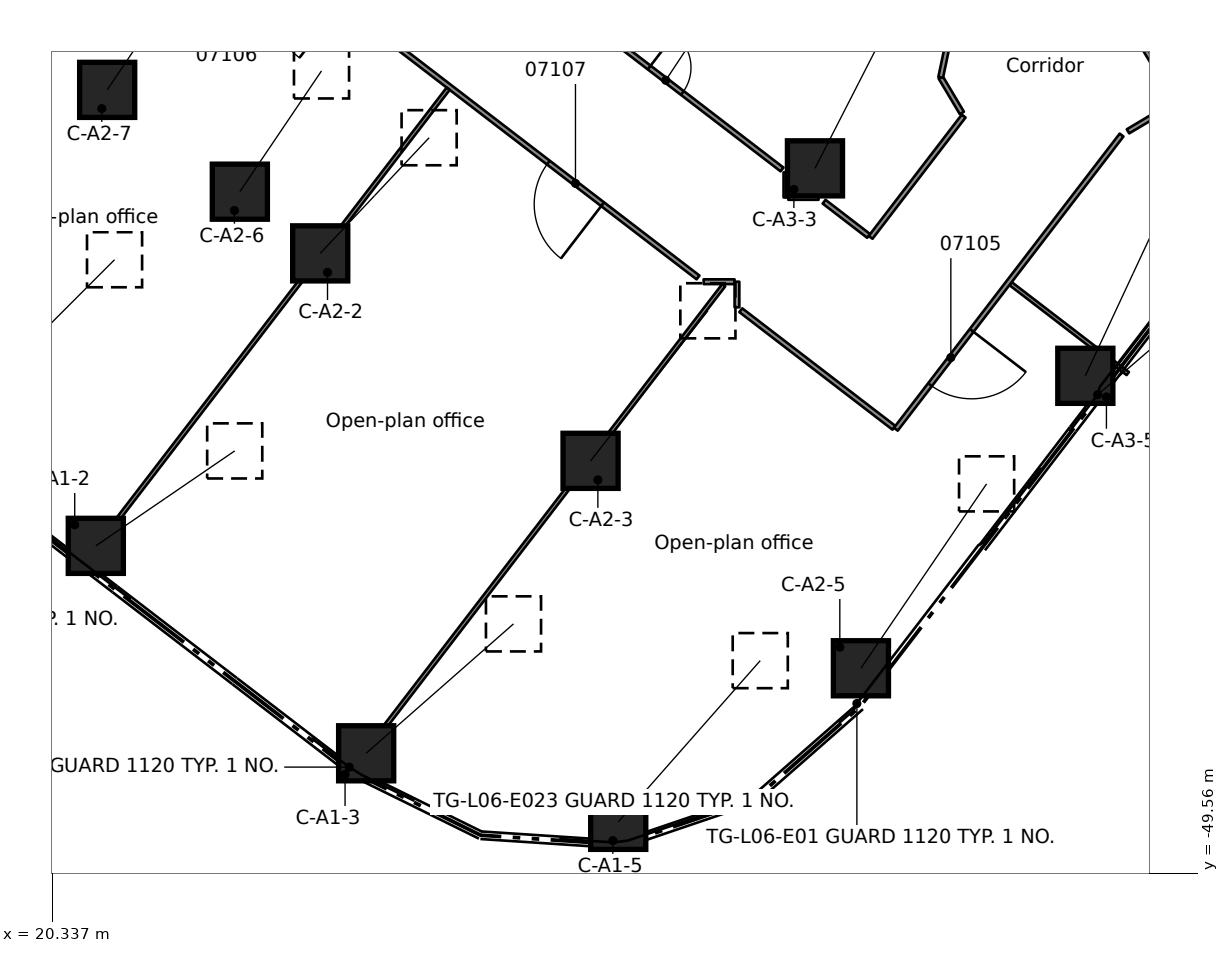
"""IFC4 building model, lengths in metres.
Left out: names, types, materials, properties, quantities, classifications, styles, units other than length and angle.
Written with IfcOpenShell. Run it as: python <this file> out.ifc"""

import sys

from ifc_helpers import new_model, si_unit, direction, frame, frame_2d, origin, origin_2d, place, context, subcontext, project, spatial, rectangle, extrude, element, fill, save


model = new_model("IFC4")
c1 = context("Model", 3, precision=1e-05, world=origin(), true_north=direction((0.0, 1.0)))
c2 = subcontext(c1, "Body", "Model", "MODEL_VIEW")
j1 = project(units=[si_unit("LENGTHUNIT", "METRE"), si_unit("PLANEANGLEUNIT", "RADIAN")], contexts=[c1])
p1 = place(None, origin())
s1 = spatial("IfcSite", under=j1, at=p1, CompositionType="ELEMENT")
p2 = place(p1, origin())
s2 = spatial("IfcBuilding", under=s1, at=p2, CompositionType="ELEMENT")
p3 = place(p2, frame((0.0, 0.0, 33.3)))
s3 = spatial("IfcBuildingStorey", under=s2, at=p3, CompositionType="ELEMENT", Elevation=33.3)
p4 = place(p3, frame((21.484, -40.939, 0.615), z_axis=(0.699835860941, 0.478306093724, 0.530521487263), x_axis=(-0.564258796598, 0.82559797145, 0.0)))
e1 = element("IfcColumn", 1, at=p4, inside=s3, PredefinedType="COLUMN", context=c2, shape_type="SweptSolid", body=[
    extrude(rectangle(XDim=1.45, YDim=1.45, at=origin_2d()), origin(), (0.0, 0.0, 1.0), 5.223),
])
p5 = place(p3, frame((28.598, -46.397, 0.641), z_axis=(0.66484395057, 0.583878759436, 0.465905693967), x_axis=(-0.659873498397, 0.751376713848, 0.0)))
e2 = element("IfcColumn", 2, at=p5, inside=s3, PredefinedType="COLUMN", context=c2, shape_type="SweptSolid", body=[
    extrude(rectangle(XDim=1.45, YDim=1.45, at=origin_2d()), origin(), (0.0, 0.0, 1.0), 5.832),
])
p6 = place(p3, frame((35.231, -48.201, 0.655), z_axis=(0.596874433276, 0.677513116755, 0.429787025777), x_axis=(-0.750349304535, 0.661041542706, 0.0)))
e3 = element("IfcColumn", 3, at=p6, inside=s3, PredefinedType="COLUMN", context=c2, shape_type="SweptSolid", body=[
    extrude(rectangle(XDim=1.45, YDim=1.45, at=origin_2d()), origin(), (0.0, 0.0, 1.0), 6.261),
])
p7 = place(p3, frame((19.364, -36.026, 0.574), z_axis=(0.559599128352, 0.560226540249, 0.610733198008), x_axis=(-0.707502845384, 0.706710495021, 0.0)))
e4 = element("IfcColumn", 4, at=p7, inside=s3, PredefinedType="COLUMN", context=c2, shape_type="SweptSolid", body=[
    extrude(rectangle(XDim=1.45, YDim=1.45, at=origin_2d()), origin(), (0.0, 0.0, 1.0), 4.669),
])
p8 = place(p3, frame((27.389, -33.243, 0.603), z_axis=(0.569969065996, 0.605170324437, 0.555791455699), x_axis=(-0.727961612842, 0.685617889373, 0.0)))
e5 = element("IfcColumn", 5, at=p8, inside=s3, PredefinedType="COLUMN", context=c2, shape_type="SweptSolid", body=[
    extrude(rectangle(XDim=1.45, YDim=1.45, at=origin_2d()), origin(), (0.0, 0.0, 1.0), 5.028),
])
p9 = place(p3, frame((34.503, -38.702, 0.637), z_axis=(0.541117976568, 0.69200623164, 0.477827072073), x_axis=(-0.78775473141, 0.615989028426, 0.0)))
e6 = element("IfcColumn", 6, at=p9, inside=s3, PredefinedType="COLUMN", context=c2, shape_type="SweptSolid", body=[
    extrude(rectangle(XDim=1.45, YDim=1.45, at=origin_2d()), origin(), (0.0, 0.0, 1.0), 5.705),
])
p10 = place(p3, frame((41.617, -44.16, 0.659), z_axis=(0.512352155116, 0.751659115504, 0.415335819823), x_axis=(-0.826300348435, 0.563229734811, 0.0)))
e7 = element("IfcColumn", 7, at=p10, inside=s3, PredefinedType="COLUMN", context=c2, shape_type="SweptSolid", body=[
    extrude(rectangle(XDim=1.45, YDim=1.45, at=origin_2d()), origin(), (0.0, 0.0, 1.0), 6.455),
])
p11 = place(p3, frame((25.274, -31.62, 0.583), z_axis=(0.450601018397, 0.666355112745, 0.594078770819), x_axis=(-0.828380682455, 0.560165551364, 0.0)))
e8 = element("IfcColumn", 8, at=p11, inside=s3, PredefinedType="COLUMN", context=c2, shape_type="SweptSolid", body=[
    extrude(rectangle(XDim=1.45, YDim=1.45, at=origin_2d()), origin(), (0.0, 0.0, 1.0), 4.77),
])
p12 = place(p3, frame((21.783, -28.941, 0.552), z_axis=(0.425847814082, 0.631092139827, 0.648364365376), x_axis=(-0.828933559632, 0.559347078044, 0.0)))
e9 = element("IfcColumn", 9, at=p12, inside=s3, PredefinedType="COLUMN", context=c2, shape_type="SweptSolid", body=[
    extrude(rectangle(XDim=1.45, YDim=1.45, at=origin_2d()), origin(), (0.0, 0.0, 1.0), 4.467),
])
p13 = place(p3, frame((40.408, -31.006, 0.638), z_axis=(0.400711857271, 0.78345915449, 0.474996590187), x_axis=(-0.890307002668, 0.455360781141, 0.0)))
e10 = element("IfcColumn", 10, at=p13, inside=s3, PredefinedType="COLUMN", context=c2, shape_type="SweptSolid", body=[
    extrude(rectangle(XDim=1.45, YDim=1.45, at=origin_2d()), origin(), (0.0, 0.0, 1.0), 5.735),
])
p14 = place(p3, frame((47.522, -36.465, 0.661), z_axis=(0.385700751852, 0.82653899246, 0.409961246905), x_axis=(-0.90619046906, 0.422869759837, 0.0)))
e11 = element("IfcColumn", 11, at=p14, inside=s3, PredefinedType="COLUMN", context=c2, shape_type="SweptSolid", body=[
    extrude(rectangle(XDim=1.45, YDim=1.45, at=origin_2d()), origin(), (0.0, 0.0, 1.0), 6.531),
])
p15 = place(p3, frame((48.015, -26.056, 0.0), z_axis=(0.0, 0.0, 1.0), x_axis=(0.511219942642, -0.859449923059, 0.0)))
e12 = element("IfcWall", 12, at=p15, inside=s3, PredefinedType="PARTITIONING", context=c2, shape_type="SweptSolid", body=[
    extrude(rectangle(XDim=3.676, YDim=0.125, at=frame_2d((1.838, 0.0))), origin(), (0.0, 0.0, 1.0), 3.56),
])
p16 = place(p15, frame((1.088, 0.0, 0.0)))
e13 = element("IfcOpeningElement", 13, at=p16, cuts=e12, PredefinedType="OPENING", context=c2, shape_type="SweptSolid", body=[
    extrude(rectangle(XDim=0.9, YDim=2.1, at=frame_2d((0.45, 1.05))), frame((0.0, 0.073, 0.0), z_axis=(0.0, -1.0, 0.0), x_axis=(1.0, 0.0, 0.0)), (0.0, 0.0, 1.0), 0.145),
])
p17 = place(p3, frame((43.716, -28.613, 0.0), z_axis=(0.0, 0.0, 1.0), x_axis=(0.511956455833, -0.859011401165, 0.0)))
e14 = element("IfcWall", 14, at=p17, inside=s3, PredefinedType="PARTITIONING", context=c2, shape_type="SweptSolid", body=[
    extrude(rectangle(XDim=1.09, YDim=0.125, at=frame_2d((0.545, 0.0))), origin(), (0.0, 0.0, 1.0), 3.56),
])
p18 = place(p3, frame((37.331, -33.877, 0.0), z_axis=(0.0, 0.0, 1.0), x_axis=(-0.793351723993, 0.608763535404, 0.0)))
e15 = element("IfcWall", 15, at=p18, inside=s3, PredefinedType="PARTITIONING", context=c2, shape_type="SweptSolid", body=[
    extrude(rectangle(XDim=16.686, YDim=0.125, at=frame_2d((8.343, 0.0))), origin(), (0.0, 0.0, 1.0), 3.56),
])
p19 = place(p18, frame((11.84, 0.0, 0.0)))
e16 = element("IfcOpeningElement", 16, at=p19, cuts=e15, PredefinedType="OPENING", context=c2, shape_type="SweptSolid", body=[
    extrude(rectangle(XDim=1.8, YDim=2.1, at=frame_2d((0.9, 1.05))), frame((0.0, 0.073, 0.0), z_axis=(0.0, -1.0, 0.0), x_axis=(1.0, 0.0, 0.0)), (0.0, 0.0, 1.0), 0.145),
])
p20 = place(p18, frame((3.166, 0.0, 0.0)))
e17 = element("IfcOpeningElement", 17, at=p20, cuts=e15, PredefinedType="OPENING", context=c2, shape_type="SweptSolid", body=[
    extrude(rectangle(XDim=1.8, YDim=2.1, at=frame_2d((0.9, 1.05))), frame((0.0, 0.073, 0.0), z_axis=(0.0, -1.0, 0.0), x_axis=(1.0, 0.0, 0.0)), (0.0, 0.0, 1.0), 0.145),
])
p21 = place(p3, frame((38.456, -34.739, 0.0), z_axis=(0.0, 0.0, 1.0), x_axis=(0.79321861851, -0.608936961638, 0.0)))
e18 = element("IfcWall", 18, at=p21, inside=s3, PredefinedType="PARTITIONING", context=c2, shape_type="SweptSolid", body=[
    extrude(rectangle(XDim=5.079, YDim=0.125, at=frame_2d((2.54, 0.0))), origin(), (0.0, 0.0, 1.0), 3.56),
])
p22 = place(p3, frame((33.534, -26.426, 0.0), z_axis=(0.0, 0.0, 1.0), x_axis=(0.793385739593, -0.60871920309, 0.0)))
e19 = element("IfcWall", 19, at=p22, inside=s3, PredefinedType="PARTITIONING", context=c2, shape_type="SweptSolid", body=[
    extrude(rectangle(XDim=7.572, YDim=0.125, at=frame_2d((3.786, 0.0))), origin(), (0.0, 0.0, 1.0), 3.56),
])
p23 = place(p22, frame((3.166, 0.0, 0.0)))
e20 = element("IfcOpeningElement", 20, at=p23, cuts=e19, PredefinedType="OPENING", context=c2, shape_type="SweptSolid", body=[
    extrude(rectangle(XDim=1.1, YDim=2.1, at=frame_2d((0.55, 1.05))), frame((0.0, 0.073, 0.0), z_axis=(0.0, -1.0, 0.0), x_axis=(1.0, 0.0, 0.0)), (0.0, 0.0, 1.0), 0.145),
])
p24 = place(p3, frame((40.648, -31.883, 0.0), z_axis=(0.0, 0.0, 1.0), x_axis=(0.792869496174, -0.609391468628, 0.0)))
e21 = element("IfcWall", 21, at=p24, inside=s3, PredefinedType="PARTITIONING", context=c2, shape_type="SweptSolid", body=[
    extrude(rectangle(XDim=1.478, YDim=0.125, at=frame_2d((0.739, 0.0))), origin(), (0.0, 0.0, 1.0), 3.56),
])
p25 = place(p3, frame((45.555, -34.039, 0.0), z_axis=(0.0, 0.0, 1.0), x_axis=(0.793288869705, -0.608845439502, 0.0)))
e22 = element("IfcWall", 22, at=p25, inside=s3, PredefinedType="PARTITIONING", context=c2, shape_type="SweptSolid", body=[
    extrude(rectangle(XDim=3.888, YDim=0.1, at=frame_2d((1.944, 0.0))), origin(), (0.0, 0.0, 1.0), 3.56),
])
p26 = place(p3, frame((37.478, -33.989, 0.0), z_axis=(0.0, 0.0, 1.0), x_axis=(1.0, 0.0, 0.0)))
e23 = element("IfcWall", 23, at=p26, inside=s3, PredefinedType="PARTITIONING", context=c2, shape_type="SweptSolid", body=[
    extrude(rectangle(XDim=0.814, YDim=0.125, at=frame_2d((0.407, 0.0))), origin(), (0.0, 0.0, 1.0), 3.56),
])
p27 = place(p3, frame((39.706, -31.771, 0.0), z_axis=(0.0, 0.0, 1.0), x_axis=(1.0, 0.0, 0.0)))
e24 = element("IfcWall", 24, at=p27, inside=s3, PredefinedType="PARTITIONING", context=c2, shape_type="SweptSolid", body=[
    extrude(rectangle(XDim=0.796, YDim=0.125, at=frame_2d((0.398, 0.0))), origin(), (0.0, 0.0, 1.0), 3.56),
])
p28 = place(p3, frame((48.645, -30.032, 0.0), z_axis=(0.0, 0.0, 1.0), x_axis=(0.859452253387, 0.511216024933, 0.0)))
e25 = element("IfcWall", 25, at=p28, inside=s3, PredefinedType="PARTITIONING", context=c2, shape_type="SweptSolid", body=[
    extrude(rectangle(XDim=1.49, YDim=0.125, at=frame_2d((0.745, 0.0))), origin(), (0.0, 0.0, 1.0), 3.56),
])
p29 = place(p3, frame((43.716, -28.613, 0.0), z_axis=(0.0, 0.0, 1.0), x_axis=(0.205677625046, 0.978619800819, 0.0)))
e26 = element("IfcWall", 26, at=p29, inside=s3, PredefinedType="PARTITIONING", context=c2, shape_type="SweptSolid", body=[
    extrude(rectangle(XDim=1.035, YDim=0.125, at=frame_2d((0.518, 0.0))), origin(), (0.0, 0.0, 1.0), 3.56),
])
p30 = place(p3, frame((48.476, -30.13, 0.0), z_axis=(0.0, 0.0, 1.0), x_axis=(-0.608819151361, -0.793309045036, 0.0)))
e27 = element("IfcWall", 27, at=p30, inside=s3, PredefinedType="PARTITIONING", context=c2, shape_type="SweptSolid", body=[
    extrude(rectangle(XDim=9.757, YDim=0.125, at=frame_2d((4.878, 0.0))), origin(), (0.0, 0.0, 1.0), 3.56),
])
p31 = place(p30, frame((6.479, 0.0, 0.0)))
e28 = element("IfcOpeningElement", 28, at=p31, cuts=e27, PredefinedType="OPENING", context=c2, shape_type="SweptSolid", body=[
    extrude(rectangle(XDim=1.8, YDim=2.1, at=frame_2d((0.9, 1.05))), frame((0.0, 0.073, 0.0), z_axis=(0.0, -1.0, 0.0), x_axis=(1.0, 0.0, 0.0)), (0.0, 0.0, 1.0), 0.145),
])
p32 = place(p3, frame((41.872, -32.822, 0.0), z_axis=(0.0, 0.0, 1.0), x_axis=(0.60869266474, 0.793406100236, 0.0)))
e29 = element("IfcWall", 29, at=p32, inside=s3, PredefinedType="PARTITIONING", context=c2, shape_type="SweptSolid", body=[
    extrude(rectangle(XDim=4.023, YDim=0.125, at=frame_2d((2.012, 0.0))), origin(), (0.0, 0.0, 1.0), 3.56),
])
p33 = place(p3, frame((28.054, -47.051, 0.0), z_axis=(0.0, 0.0, 1.0), x_axis=(0.608787965218, 0.793332977636, 0.0)))
e30 = element("IfcWall", 30, at=p33, inside=s3, PredefinedType="PARTITIONING", context=c2, shape_type="SweptSolid", body=[
    extrude(rectangle(XDim=16.347, YDim=0.1, at=frame_2d((8.174, 0.0))), origin(), (0.0, 0.0, 1.0), 3.56),
])
p34 = place(p3, frame((20.993, -41.633, 0.0), z_axis=(0.0, 0.0, 1.0), x_axis=(0.608805416173, 0.793319585816, 0.0)))
e31 = element("IfcWall", 31, at=p34, inside=s3, PredefinedType="PARTITIONING", context=c2, shape_type="SweptSolid", body=[
    extrude(rectangle(XDim=16.037, YDim=0.1, at=frame_2d((8.018, 0.0))), origin(), (0.0, 0.0, 1.0), 3.56),
])
p35 = place(p3, frame((39.644, -31.771, 0.0), z_axis=(0.0, 0.0, 1.0), x_axis=(0.0, 1.0, 0.0)))
e32 = element("IfcWall", 32, at=p35, inside=s3, PredefinedType="PARTITIONING", context=c2, shape_type="SweptSolid", body=[
    extrude(rectangle(XDim=0.659, YDim=0.125, at=frame_2d((0.33, 0.0))), origin(), (0.0, 0.0, 1.0), 3.56),
])
p36 = place(p3, frame((38.355, -34.662, 0.0), z_axis=(0.0, 0.0, 1.0), x_axis=(0.0, 1.0, 0.0)))
e33 = element("IfcWall", 33, at=p36, inside=s3, PredefinedType="PARTITIONING", context=c2, shape_type="SweptSolid", body=[
    extrude(rectangle(XDim=0.673, YDim=0.125, at=frame_2d((0.336, 0.0))), origin(), (0.0, 0.0, 1.0), 3.56),
])
p37 = place(p23, origin())
e34 = element("IfcDoor", 34, at=p37, inside=s3, OperationType="SINGLE_SWING_LEFT", PredefinedType="DOOR", context=c2, shape_type="SweptSolid", body=[
    extrude(rectangle(XDim=1.1, YDim=2.1, at=frame_2d((0.55, 1.05))), frame((0.0, 0.025, 0.0), z_axis=(0.0, -1.0, 0.0), x_axis=(1.0, 0.0, 0.0)), (0.0, 0.0, 1.0), 0.05),
])
fill(e20, e34)
p38 = place(p31, origin())
e35 = element("IfcDoor", 35, at=p38, inside=s3, OperationType="DOUBLE_DOOR_SINGLE_SWING", PredefinedType="DOOR", context=c2, shape_type="SweptSolid", body=[
    extrude(rectangle(XDim=1.8, YDim=2.1, at=frame_2d((0.9, 1.05))), frame((0.0, 0.025, 0.0), z_axis=(0.0, -1.0, 0.0), x_axis=(1.0, 0.0, 0.0)), (0.0, 0.0, 1.0), 0.05),
])
fill(e28, e35)
p39 = place(p20, origin())
e36 = element("IfcDoor", 36, at=p39, inside=s3, OperationType="DOUBLE_DOOR_SINGLE_SWING", PredefinedType="DOOR", context=c2, shape_type="SweptSolid", body=[
    extrude(rectangle(XDim=1.8, YDim=2.1, at=frame_2d((0.9, 1.05))), frame((0.0, 0.025, 0.0), z_axis=(0.0, -1.0, 0.0), x_axis=(1.0, 0.0, 0.0)), (0.0, 0.0, 1.0), 0.05),
])
fill(e17, e36)
save(model, sys.argv[1])
